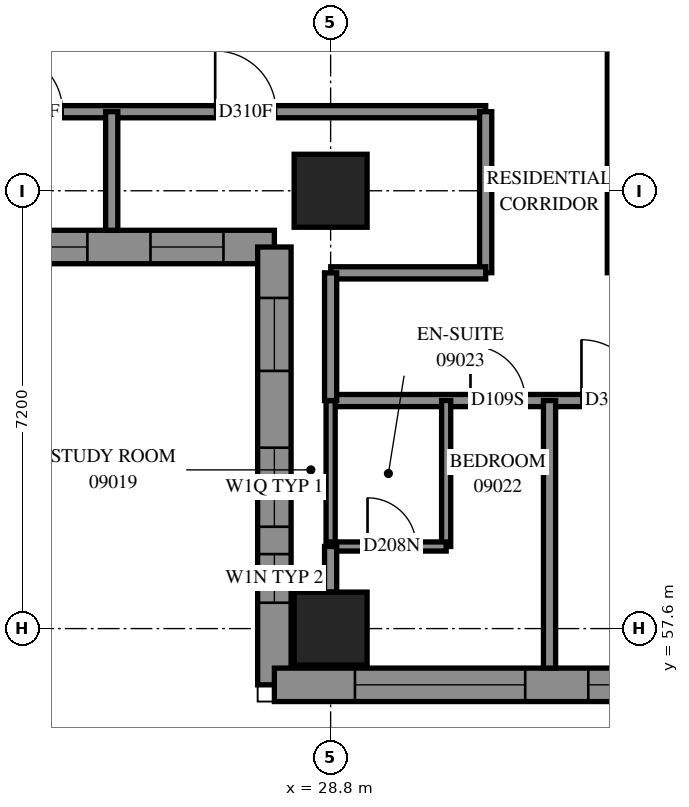
"""IFC4 building model, lengths in metres.
Left out: names, types, materials, properties, quantities, classifications, styles, units other than length and angle.
Written with IfcOpenShell. Run it as: python <this file> out.ifc"""

import sys

from ifc_helpers import new_model, si_unit, direction, frame, frame_2d, origin, origin_2d, place, context, subcontext, project, spatial, polyline, rectangle, outline, extrude, element, fill, save


model = new_model("IFC4")
c1 = context("Model", 3, precision=1e-05, world=origin(), true_north=direction((0.0, 1.0)))
c2 = subcontext(c1, "Body", "Model", "MODEL_VIEW")
j1 = project(units=[si_unit("LENGTHUNIT", "METRE"), si_unit("PLANEANGLEUNIT", "RADIAN")], contexts=[c1])
p1 = place(None, origin())
s1 = spatial("IfcSite", under=j1, at=p1, CompositionType="ELEMENT")
p2 = place(p1, origin())
s2 = spatial("IfcBuilding", under=s1, at=p2, CompositionType="ELEMENT")
p3 = place(p2, frame((0.0, 0.0, 37.2)))
s3 = spatial("IfcBuildingStorey", under=s2, at=p3, CompositionType="ELEMENT", Elevation=37.2)
for number, where, z_axis, x_axis in (
    (1, (28.8, 57.6, 0.0), (0.0, 0.0, 1.0), (1.0, 0.0, 0.0)),
    (2, (28.8, 64.8, 0.0), (0.0, 0.0, 1.0), (1.0, 0.0, 0.0)),
):
    element("IfcColumn", number, at=place(p3, frame(where, z_axis=z_axis, x_axis=x_axis)), inside=s3, PredefinedType="COLUMN", context=c2, shape_type="SweptSolid", body=[
        extrude(rectangle(XDim=1.2, YDim=1.2, at=origin_2d()), origin(), (0.0, 0.0, 1.0), 3.1),
    ])
p4 = place(p3, frame((19.684, 63.875, 0.0), z_axis=(0.0, 0.0, 1.0), x_axis=(1.0, 0.0, 0.0)))
e3 = element("IfcWall", 3, at=p4, inside=s3, PredefinedType="SOLIDWALL", context=c2, shape_type="SweptSolid", body=[
    extrude(outline(polyline([(-0.275, -0.275), (7.916, -0.275), (8.466, 0.275), (0.275, 0.275), (-0.275, -0.275)])), origin(), (0.0, 0.0, 1.0), 3.1),
])
p5 = place(p4, frame((2.316, 0.0, 0.5)))
e4 = element("IfcOpeningElement", 4, at=p5, cuts=e3, PredefinedType="OPENING", context=c2, shape_type="SweptSolid", body=[
    extrude(rectangle(XDim=2.8, YDim=2.45, at=frame_2d((1.4, 1.225))), frame((0.0, 0.285, 0.0), z_axis=(0.0, -1.0, 0.0), x_axis=(1.0, 0.0, 0.0)), (0.0, 0.0, 1.0), 0.57),
])
p6 = place(p4, frame((6.154, 0.0, 0.5)))
e5 = element("IfcOpeningElement", 5, at=p6, cuts=e3, PredefinedType="OPENING", context=c2, shape_type="SweptSolid", body=[
    extrude(rectangle(XDim=1.2, YDim=2.45, at=frame_2d((0.6, 1.225))), frame((0.0, 0.285, 0.0), z_axis=(0.0, -1.0, 0.0), x_axis=(1.0, 0.0, 0.0)), (0.0, 0.0, 1.0), 0.57),
])
p7 = place(p3, frame((27.875, 63.875, 0.0), z_axis=(0.0, 0.0, 1.0), x_axis=(0.0, -1.0, 0.0)))
e6 = element("IfcWall", 6, at=p7, inside=s3, PredefinedType="SOLIDWALL", context=c2, shape_type="SweptSolid", body=[
    extrude(outline(polyline([(0.275, -0.275), (7.475, -0.275), (6.925, 0.275), (-0.275, 0.275), (0.275, -0.275)])), origin(), (0.0, 0.0, 1.0), 3.1),
])
p8 = place(p7, frame((0.838, 0.0, 0.5)))
e7 = element("IfcOpeningElement", 7, at=p8, cuts=e6, PredefinedType="OPENING", context=c2, shape_type="SweptSolid", body=[
    extrude(rectangle(XDim=1.2, YDim=2.45, at=frame_2d((0.6, 1.225))), frame((0.0, 0.285, 0.0), z_axis=(0.0, -1.0, 0.0), x_axis=(1.0, 0.0, 0.0)), (0.0, 0.0, 1.0), 0.57),
])
p9 = place(p7, frame((3.3, 0.0, 0.45)))
e8 = element("IfcOpeningElement", 8, at=p9, cuts=e6, PredefinedType="OPENING", context=c2, shape_type="SweptSolid", body=[
    extrude(rectangle(XDim=1.3, YDim=2.5, at=frame_2d((0.65, 1.25))), frame((0.0, 0.285, 0.0), z_axis=(0.0, -1.0, 0.0), x_axis=(1.0, 0.0, 0.0)), (0.0, 0.0, 1.0), 0.57),
])
p10 = place(p7, frame((5.05, 0.0, 0.45)))
e9 = element("IfcOpeningElement", 9, at=p10, cuts=e6, PredefinedType="OPENING", context=c2, shape_type="SweptSolid", body=[
    extrude(rectangle(XDim=0.8, YDim=2.5, at=frame_2d((0.4, 1.25))), frame((0.0, 0.285, 0.0), z_axis=(0.0, -1.0, 0.0), x_axis=(1.0, 0.0, 0.0)), (0.0, 0.0, 1.0), 0.57),
])
p11 = place(p3, frame((27.875, 56.675, 0.0), z_axis=(0.0, 0.0, 1.0), x_axis=(1.0, 0.0, 0.0)))
e10 = element("IfcWall", 10, at=p11, inside=s3, PredefinedType="SOLIDWALL", context=c2, shape_type="SweptSolid", body=[
    extrude(outline(polyline([(-0.275, -0.275), (6.925, -0.275), (7.475, 0.275), (0.275, 0.275), (-0.275, -0.275)])), origin(), (0.0, 0.0, 1.0), 3.1),
])
p12 = place(p11, frame((1.325, 0.0, 0.5)))
e11 = element("IfcOpeningElement", 11, at=p12, cuts=e10, PredefinedType="OPENING", context=c2, shape_type="SweptSolid", body=[
    extrude(rectangle(XDim=2.8, YDim=2.45, at=frame_2d((1.4, 1.225))), frame((0.0, 0.285, 0.0), z_axis=(0.0, -1.0, 0.0), x_axis=(1.0, 0.0, 0.0)), (0.0, 0.0, 1.0), 0.57),
])
p13 = place(p11, frame((5.162, 0.0, 0.5)))
e12 = element("IfcOpeningElement", 12, at=p13, cuts=e10, PredefinedType="OPENING", context=c2, shape_type="SweptSolid", body=[
    extrude(rectangle(XDim=1.2, YDim=2.45, at=frame_2d((0.6, 1.225))), frame((0.0, 0.285, 0.0), z_axis=(0.0, -1.0, 0.0), x_axis=(1.0, 0.0, 0.0)), (0.0, 0.0, 1.0), 0.57),
])
p14 = place(p3, frame((28.8, 61.35, 0.0), z_axis=(0.0, 0.0, 1.0), x_axis=(1.0, 0.0, 0.0)))
e13 = element("IfcWall", 13, at=p14, inside=s3, PredefinedType="PARTITIONING", context=c2, shape_type="SweptSolid", body=[
    extrude(rectangle(XDim=24.15, YDim=0.2, at=frame_2d((12.075, 0.0))), origin(), (0.0, 0.0, 1.0), 3.1),
])
p15 = place(p14, frame((2.3, 0.0, 0.0)))
e14 = element("IfcOpeningElement", 14, at=p15, cuts=e13, PredefinedType="OPENING", context=c2, shape_type="SweptSolid", body=[
    extrude(rectangle(XDim=0.9, YDim=2.1, at=frame_2d((0.45, 1.05))), frame((0.0, 0.11, 0.0), z_axis=(0.0, -1.0, 0.0), x_axis=(1.0, 0.0, 0.0)), (0.0, 0.0, 1.0), 0.22),
])
p16 = place(p14, frame((4.125, 0.0, 0.0)))
e15 = element("IfcOpeningElement", 15, at=p16, cuts=e13, PredefinedType="OPENING", context=c2, shape_type="SweptSolid", body=[
    extrude(rectangle(XDim=1.0, YDim=2.1, at=frame_2d((0.5, 1.05))), frame((0.0, 0.11, 0.0), z_axis=(0.0, -1.0, 0.0), x_axis=(1.0, 0.0, 0.0)), (0.0, 0.0, 1.0), 0.22),
])
p17 = place(p14, frame((11.061, 0.0, 0.0)))
e16 = element("IfcOpeningElement", 16, at=p17, cuts=e13, PredefinedType="OPENING", context=c2, shape_type="SweptSolid", body=[
    extrude(rectangle(XDim=0.9, YDim=2.1, at=frame_2d((0.45, 1.05))), frame((0.0, 0.11, 0.0), z_axis=(0.0, -1.0, 0.0), x_axis=(1.0, 0.0, 0.0)), (0.0, 0.0, 1.0), 0.22),
])
p18 = place(p14, frame((16.7, 0.0, 0.0)))
e17 = element("IfcOpeningElement", 17, at=p18, cuts=e13, PredefinedType="OPENING", context=c2, shape_type="SweptSolid", body=[
    extrude(rectangle(XDim=0.9, YDim=2.1, at=frame_2d((0.45, 1.05))), frame((0.0, 0.11, 0.0), z_axis=(0.0, -1.0, 0.0), x_axis=(1.0, 0.0, 0.0)), (0.0, 0.0, 1.0), 0.22),
])
p19 = place(p14, frame((18.508, 0.0, 0.0)))
e18 = element("IfcOpeningElement", 18, at=p19, cuts=e13, PredefinedType="OPENING", context=c2, shape_type="SweptSolid", body=[
    extrude(rectangle(XDim=1.0, YDim=2.1, at=frame_2d((0.5, 1.05))), frame((0.0, 0.11, 0.0), z_axis=(0.0, -1.0, 0.0), x_axis=(1.0, 0.0, 0.0)), (0.0, 0.0, 1.0), 0.22),
])
p20 = place(p14, frame((22.882, 0.0, 0.0)))
e19 = element("IfcOpeningElement", 19, at=p20, cuts=e13, PredefinedType="OPENING", context=c2, shape_type="SweptSolid", body=[
    extrude(rectangle(XDim=1.0, YDim=2.1, at=frame_2d((0.5, 1.05))), frame((0.0, 0.11, 0.0), z_axis=(0.0, -1.0, 0.0), x_axis=(1.0, 0.0, 0.0)), (0.0, 0.0, 1.0), 0.22),
])
p21 = place(p3, frame((21.602, 66.1, 0.0), z_axis=(0.0, 0.0, 1.0), x_axis=(1.0, 0.0, 0.0)))
e20 = element("IfcWall", 20, at=p21, inside=s3, PredefinedType="PARTITIONING", context=c2, shape_type="SweptSolid", body=[
    extrude(rectangle(XDim=9.748, YDim=0.2, at=frame_2d((4.874, 0.0))), origin(), (0.0, 0.0, 1.0), 3.1),
])
p22 = place(p21, frame((1.791, 0.0, 0.0)))
e21 = element("IfcOpeningElement", 21, at=p22, cuts=e20, PredefinedType="OPENING", context=c2, shape_type="SweptSolid", body=[
    extrude(rectangle(XDim=1.0, YDim=2.1, at=frame_2d((0.5, 1.05))), frame((0.0, 0.11, 0.0), z_axis=(0.0, -1.0, 0.0), x_axis=(1.0, 0.0, 0.0)), (0.0, 0.0, 1.0), 0.22),
])
p23 = place(p21, frame((5.3, 0.0, 0.0)))
e22 = element("IfcOpeningElement", 22, at=p23, cuts=e20, PredefinedType="OPENING", context=c2, shape_type="SweptSolid", body=[
    extrude(rectangle(XDim=1.0, YDim=2.1, at=frame_2d((0.5, 1.05))), frame((0.0, 0.11, 0.0), z_axis=(0.0, -1.0, 0.0), x_axis=(1.0, 0.0, 0.0)), (0.0, 0.0, 1.0), 0.22),
])
p24 = place(p3, frame((33.45, 63.452, 0.0), z_axis=(0.0, 0.0, 1.0), x_axis=(0.0, 1.0, 0.0)))
e23 = element("IfcWall", 23, at=p24, inside=s3, PredefinedType="PARTITIONING", context=c2, shape_type="SweptSolid", body=[
    extrude(rectangle(XDim=4.748, YDim=0.2, at=frame_2d((2.374, 0.0))), origin(), (0.0, 0.0, 1.0), 3.1),
])
p25 = place(p3, frame((32.4, 56.95, 0.0), z_axis=(0.0, 0.0, 1.0), x_axis=(0.0, 1.0, 0.0)))
e24 = element("IfcWall", 24, at=p25, inside=s3, PredefinedType="PARTITIONING", context=c2, shape_type="SweptSolid", body=[
    extrude(rectangle(XDim=4.4, YDim=0.2, at=frame_2d((2.2, 0.0))), origin(), (0.0, 0.0, 1.0), 3.1),
])
p26 = place(p3, frame((31.35, 63.452, 0.0), z_axis=(0.0, 0.0, 1.0), x_axis=(0.0, 1.0, 0.0)))
e25 = element("IfcWall", 25, at=p26, inside=s3, PredefinedType="PARTITIONING", context=c2, shape_type="SweptSolid", body=[
    extrude(rectangle(XDim=2.648, YDim=0.2, at=frame_2d((1.324, 0.0))), origin(), (0.0, 0.0, 1.0), 3.1),
])
p27 = place(p3, frame((28.802, 63.45, 0.0), z_axis=(0.0, 0.0, 1.0), x_axis=(1.0, 0.0, 0.0)))
e26 = element("IfcWall", 26, at=p27, inside=s3, PredefinedType="PARTITIONING", context=c2, shape_type="SweptSolid", body=[
    extrude(rectangle(XDim=2.548, YDim=0.2, at=frame_2d((1.274, 0.0))), origin(), (0.0, 0.0, 1.0), 3.1),
])
p28 = place(p3, frame((30.7, 58.95, 0.0), z_axis=(0.0, 0.0, 1.0), x_axis=(0.0, 1.0, 0.0)))
e27 = element("IfcWall", 27, at=p28, inside=s3, PredefinedType="PARTITIONING", context=c2, shape_type="SweptSolid", body=[
    extrude(rectangle(XDim=2.4, YDim=0.15, at=frame_2d((1.2, 0.0))), origin(), (0.0, 0.0, 1.0), 3.1),
])
p29 = place(p3, frame((28.8, 58.95, 0.0), z_axis=(0.0, 0.0, 1.0), x_axis=(0.0, 1.0, 0.0)))
e28 = element("IfcWall", 28, at=p29, inside=s3, PredefinedType="PARTITIONING", context=c2, shape_type="SweptSolid", body=[
    extrude(rectangle(XDim=2.4, YDim=0.15, at=frame_2d((1.2, 0.0))), origin(), (0.0, 0.0, 1.0), 2.6),
])
p30 = place(p3, frame((28.8, 61.35, 0.0), z_axis=(0.0, 0.0, 1.0), x_axis=(0.0, 1.0, 0.0)))
e29 = element("IfcWall", 29, at=p30, inside=s3, PredefinedType="PARTITIONING", context=c2, shape_type="SweptSolid", body=[
    extrude(rectangle(XDim=2.1, YDim=0.2, at=frame_2d((1.05, 0.0))), origin(), (0.0, 0.0, 1.0), 2.6),
])
p31 = place(p3, frame((28.8, 58.95, 0.0), z_axis=(0.0, 0.0, 1.0), x_axis=(1.0, 0.0, 0.0)))
e30 = element("IfcWall", 30, at=p31, inside=s3, PredefinedType="PARTITIONING", context=c2, shape_type="SweptSolid", body=[
    extrude(rectangle(XDim=1.9, YDim=0.15, at=frame_2d((0.95, 0.0))), origin(), (0.0, 0.0, 1.0), 3.1),
])
p32 = place(p31, frame((0.607, 0.0, 0.0)))
e31 = element("IfcOpeningElement", 31, at=p32, cuts=e30, PredefinedType="OPENING", context=c2, shape_type="SweptSolid", body=[
    extrude(rectangle(XDim=0.8, YDim=2.1, at=frame_2d((0.4, 1.05))), frame((0.0, 0.085, 0.0), z_axis=(0.0, -1.0, 0.0), x_axis=(1.0, 0.0, 0.0)), (0.0, 0.0, 1.0), 0.17),
])
p33 = place(p3, frame((25.2, 64.15, 0.0), z_axis=(0.0, 0.0, 1.0), x_axis=(0.0, 1.0, 0.0)))
e32 = element("IfcWall", 32, at=p33, inside=s3, PredefinedType="PARTITIONING", context=c2, shape_type="SweptSolid", body=[
    extrude(rectangle(XDim=1.95, YDim=0.2, at=frame_2d((0.975, 0.0))), origin(), (0.0, 0.0, 1.0), 3.1),
])
p34 = place(p3, frame((28.8, 58.2, 0.0), z_axis=(0.0, 0.0, 1.0), x_axis=(0.0, 1.0, 0.0)))
e33 = element("IfcWall", 33, at=p34, inside=s3, PredefinedType="PARTITIONING", context=c2, shape_type="SweptSolid", body=[
    extrude(rectangle(XDim=0.75, YDim=0.2, at=frame_2d((0.375, 0.0))), origin(), (0.0, 0.0, 1.0), 2.6),
])
p35 = place(p5, origin())
e34 = element("IfcWindow", 34, at=p35, inside=s3, PartitioningType="SINGLE_PANEL", PredefinedType="WINDOW", context=c2, shape_type="SweptSolid", body=[
    extrude(rectangle(XDim=2.8, YDim=2.45, at=frame_2d((1.4, 1.225))), frame((0.0, 0.155, 0.0), z_axis=(0.0, -1.0, 0.0), x_axis=(1.0, 0.0, 0.0)), (0.0, 0.0, 1.0), 0.06),
])
fill(e4, e34)
p36 = place(p6, origin())
e35 = element("IfcWindow", 35, at=p36, inside=s3, PartitioningType="SINGLE_PANEL", PredefinedType="WINDOW", context=c2, shape_type="SweptSolid", body=[
    extrude(rectangle(XDim=1.2, YDim=2.45, at=frame_2d((0.6, 1.225))), frame((0.0, 0.155, 0.0), z_axis=(0.0, -1.0, 0.0), x_axis=(1.0, 0.0, 0.0)), (0.0, 0.0, 1.0), 0.06),
])
fill(e5, e35)
p37 = place(p8, origin())
e36 = element("IfcWindow", 36, at=p37, inside=s3, PartitioningType="SINGLE_PANEL", PredefinedType="WINDOW", context=c2, shape_type="SweptSolid", body=[
    extrude(rectangle(XDim=1.2, YDim=2.45, at=frame_2d((0.6, 1.225))), frame((0.0, 0.155, 0.0), z_axis=(0.0, -1.0, 0.0), x_axis=(1.0, 0.0, 0.0)), (0.0, 0.0, 1.0), 0.06),
])
fill(e7, e36)
p38 = place(p12, origin())
e37 = element("IfcWindow", 37, at=p38, inside=s3, PartitioningType="SINGLE_PANEL", PredefinedType="WINDOW", context=c2, shape_type="SweptSolid", body=[
    extrude(rectangle(XDim=2.8, YDim=2.45, at=frame_2d((1.4, 1.225))), frame((0.0, 0.155, 0.0), z_axis=(0.0, -1.0, 0.0), x_axis=(1.0, 0.0, 0.0)), (0.0, 0.0, 1.0), 0.06),
])
fill(e11, e37)
p39 = place(p13, origin())
e38 = element("IfcWindow", 38, at=p39, inside=s3, PartitioningType="SINGLE_PANEL", PredefinedType="WINDOW", context=c2, shape_type="SweptSolid", body=[
    extrude(rectangle(XDim=1.2, YDim=2.45, at=frame_2d((0.6, 1.225))), frame((0.0, 0.155, 0.0), z_axis=(0.0, -1.0, 0.0), x_axis=(1.0, 0.0, 0.0)), (0.0, 0.0, 1.0), 0.06),
])
fill(e12, e38)
p40 = place(p22, origin())
e39 = element("IfcDoor", 39, at=p40, inside=s3, OperationType="SINGLE_SWING_RIGHT", PredefinedType="DOOR", context=c2, shape_type="SweptSolid", body=[
    extrude(rectangle(XDim=1.0, YDim=2.1, at=frame_2d((0.5, 1.05))), frame((0.0, 0.025, 0.0), z_axis=(0.0, -1.0, 0.0), x_axis=(1.0, 0.0, 0.0)), (0.0, 0.0, 1.0), 0.05),
])
fill(e21, e39)
p41 = place(p23, origin())
e40 = element("IfcDoor", 40, at=p41, inside=s3, OperationType="SINGLE_SWING_RIGHT", PredefinedType="DOOR", context=c2, shape_type="SweptSolid", body=[
    extrude(rectangle(XDim=1.0, YDim=2.1, at=frame_2d((0.5, 1.05))), frame((0.0, 0.025, 0.0), z_axis=(0.0, -1.0, 0.0), x_axis=(1.0, 0.0, 0.0)), (0.0, 0.0, 1.0), 0.05),
])
fill(e22, e40)
p42 = place(p15, origin())
e41 = element("IfcDoor", 41, at=p42, inside=s3, OperationType="SINGLE_SWING_LEFT", PredefinedType="DOOR", context=c2, shape_type="SweptSolid", body=[
    extrude(rectangle(XDim=0.9, YDim=2.1, at=frame_2d((0.45, 1.05))), frame((0.0, 0.025, 0.0), z_axis=(0.0, -1.0, 0.0), x_axis=(1.0, 0.0, 0.0)), (0.0, 0.0, 1.0), 0.05),
])
fill(e14, e41)
p43 = place(p32, origin())
e42 = element("IfcDoor", 42, at=p43, inside=s3, OperationType="SINGLE_SWING_RIGHT", PredefinedType="DOOR", context=c2, shape_type="SweptSolid", body=[
    extrude(rectangle(XDim=0.8, YDim=2.1, at=frame_2d((0.4, 1.05))), frame((0.0, 0.025, 0.0), z_axis=(0.0, -1.0, 0.0), x_axis=(1.0, 0.0, 0.0)), (0.0, 0.0, 1.0), 0.05),
])
fill(e31, e42)
p44 = place(p16, origin())
e43 = element("IfcDoor", 43, at=p44, inside=s3, OperationType="SINGLE_SWING_RIGHT", PredefinedType="DOOR", context=c2, shape_type="SweptSolid", body=[
    extrude(rectangle(XDim=1.0, YDim=2.1, at=frame_2d((0.5, 1.05))), frame((0.0, 0.025, 0.0), z_axis=(0.0, -1.0, 0.0), x_axis=(1.0, 0.0, 0.0)), (0.0, 0.0, 1.0), 0.05),
])
fill(e15, e43)
p45 = place(p9, origin())
e44 = element("IfcWindow", 44, at=p45, inside=s3, PartitioningType="SINGLE_PANEL", PredefinedType="WINDOW", context=c2, shape_type="SweptSolid", body=[
    extrude(rectangle(XDim=1.3, YDim=2.5, at=frame_2d((0.65, 1.25))), frame((0.0, 0.155, 0.0), z_axis=(0.0, -1.0, 0.0), x_axis=(1.0, 0.0, 0.0)), (0.0, 0.0, 1.0), 0.06),
])
fill(e8, e44)
p46 = place(p10, origin())
e45 = element("IfcWindow", 45, at=p46, inside=s3, PartitioningType="SINGLE_PANEL", PredefinedType="WINDOW", context=c2, shape_type="SweptSolid", body=[
    extrude(rectangle(XDim=0.8, YDim=2.5, at=frame_2d((0.4, 1.25))), frame((0.0, 0.155, 0.0), z_axis=(0.0, -1.0, 0.0), x_axis=(1.0, 0.0, 0.0)), (0.0, 0.0, 1.0), 0.06),
])
fill(e9, e45)
save(model, sys.argv[1])
